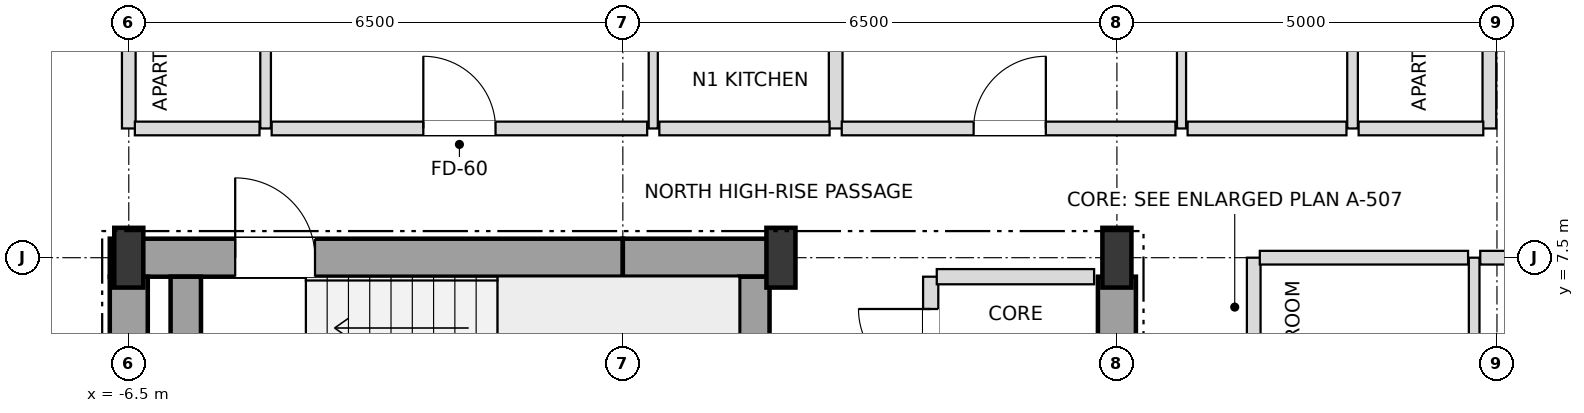
"""IFC4 building model, lengths in metres.
Left out: names, types, materials, properties, quantities, classifications, styles, units other than length and angle.
Written with IfcOpenShell. Run it as: python <this file> out.ifc"""

import sys

from ifc_helpers import new_model, si_unit, direction, frame, frame_2d, origin, origin_2d, place, context, subcontext, project, spatial, rectangle, i_section, extrude, element, fill, save


model = new_model("IFC4")
c1 = context("Model", 3, precision=1e-05, world=origin(), true_north=direction((0.0, 1.0)))
c2 = subcontext(c1, "Body", "Model", "MODEL_VIEW")
j1 = project(units=[si_unit("LENGTHUNIT", "METRE"), si_unit("PLANEANGLEUNIT", "RADIAN")], contexts=[c1])
p1 = place(None, origin())
s1 = spatial("IfcSite", under=j1, at=p1, CompositionType="ELEMENT")
p2 = place(p1, origin())
s2 = spatial("IfcBuilding", under=s1, at=p2, CompositionType="ELEMENT")
p3 = place(p2, frame((0.0, 0.0, 240.3)))
s3 = spatial("IfcBuildingStorey", under=s2, at=p3, CompositionType="ELEMENT", Elevation=240.3)
for number, where, z_axis, x_axis in (
    (1, (-6.5, 7.5, 0.0), (0.0, 0.0, 1.0), (1.0, 0.0, 0.0)),
    (2, (2.08, 7.5, 0.0), (0.0, 0.0, 1.0), (1.0, 0.0, 0.0)),
    (3, (6.5, 7.5, 0.0), (0.0, 0.0, 1.0), (1.0, 0.0, 0.0)),
):
    element("IfcColumn", number, at=place(p3, frame(where, z_axis=z_axis, x_axis=x_axis)), inside=s3, PredefinedType="COLUMN", context=c2, shape_type="SweptSolid", body=[
        extrude(i_section(OverallWidth=0.382, OverallDepth=0.786, WebThickness=0.02, FlangeThickness=0.033, at=origin_2d()), origin(), (0.0, 0.0, 1.0), 3.6),
    ])
p4 = place(p3, frame((-6.75, 7.5, 0.0), z_axis=(0.0, 0.0, 1.0), x_axis=(1.0, 0.0, 0.0)))
e4 = element("IfcWall", 4, at=p4, inside=s3, PredefinedType="SHEAR", context=c2, shape_type="SweptSolid", body=[
    extrude(rectangle(XDim=6.75, YDim=0.5, at=frame_2d((3.375, 0.0))), origin(), (0.0, 0.0, 1.0), 3.38),
])
p5 = place(p4, frame((1.65, 0.0, 0.0)))
e5 = element("IfcOpeningElement", 5, at=p5, cuts=e4, PredefinedType="OPENING", context=c2, shape_type="SweptSolid", body=[
    extrude(rectangle(XDim=1.05, YDim=2.15, at=frame_2d((0.525, 1.075))), frame((0.0, 0.26, 0.0), z_axis=(0.0, -1.0, 0.0), x_axis=(1.0, 0.0, 0.0)), (0.0, 0.0, 1.0), 0.52),
])
p6 = place(p3, frame((0.0, 7.5, 0.0), z_axis=(0.0, 0.0, 1.0), x_axis=(1.0, 0.0, 0.0)))
e6 = element("IfcWall", 6, at=p6, inside=s3, PredefinedType="SHEAR", context=c2, shape_type="SweptSolid", body=[
    extrude(rectangle(XDim=2.08, YDim=0.5, at=frame_2d((1.04, 0.0))), origin(), (0.0, 0.0, 1.0), 3.38),
])
for number, where, z_axis, x_axis in (
    (7, (-6.5, 3.95, 0.0), (0.0, 0.0, 1.0), (0.0, 1.0, 0.0)),
    (8, (6.5, 3.95, 0.0), (0.0, 0.0, 1.0), (0.0, 1.0, 0.0)),
):
    element("IfcWall", number, at=place(p3, frame(where, z_axis=z_axis, x_axis=x_axis)), inside=s3, PredefinedType="SHEAR", context=c2, shape_type="SweptSolid", body=[
        extrude(rectangle(XDim=3.3, YDim=0.5, at=frame_2d((1.65, 0.0))), origin(), (0.0, 0.0, 1.0), 3.38),
    ])
for number, where, z_axis, x_axis in (
    (9, (1.73, 3.95, 0.0), (0.0, 0.0, 1.0), (0.0, 1.0, 0.0)),
    (10, (-5.75, 3.95, 0.0), (0.0, 0.0, 1.0), (0.0, 1.0, 0.0)),
):
    element("IfcWall", number, at=place(p3, frame(where, z_axis=z_axis, x_axis=x_axis)), inside=s3, PredefinedType="SHEAR", context=c2, shape_type="SweptSolid", body=[
        extrude(rectangle(XDim=3.3, YDim=0.4, at=frame_2d((1.65, 0.0))), origin(), (0.0, 0.0, 1.0), 3.38),
    ])
p7 = place(p3, frame((-6.5, 9.2, 0.0), z_axis=(0.0, 0.0, 1.0), x_axis=(0.0, 1.0, 0.0)))
e11 = element("IfcWall", 11, at=p7, inside=s3, PredefinedType="PARTITIONING", context=c2, shape_type="SweptSolid", body=[
    extrude(rectangle(XDim=10.7, YDim=0.18, at=frame_2d((5.35, 0.0))), origin(), (0.0, 0.0, 1.0), 2.826),
])
p8 = place(p3, frame((-4.7, 9.2, 0.0), z_axis=(0.0, 0.0, 1.0), x_axis=(0.0, 1.0, 0.0)))
e12 = element("IfcWall", 12, at=p8, inside=s3, PredefinedType="PARTITIONING", context=c2, shape_type="SweptSolid", body=[
    extrude(rectangle(XDim=4.7, YDim=0.14, at=frame_2d((2.35, 0.0))), origin(), (0.0, 0.0, 1.0), 3.38),
])
p9 = place(p8, frame((1.9, 0.0, 0.0)))
e13 = element("IfcOpeningElement", 13, at=p9, cuts=e12, PredefinedType="OPENING", context=c2, shape_type="SweptSolid", body=[
    extrude(rectangle(XDim=0.9, YDim=2.1, at=frame_2d((0.45, 1.05))), frame((0.0, 0.08, 0.0), z_axis=(0.0, -1.0, 0.0), x_axis=(1.0, 0.0, 0.0)), (0.0, 0.0, 1.0), 0.16),
])
p10 = place(p3, frame((0.4, 9.2, 0.0), z_axis=(0.0, 0.0, 1.0), x_axis=(0.0, 1.0, 0.0)))
e14 = element("IfcWall", 14, at=p10, inside=s3, PredefinedType="PARTITIONING", context=c2, shape_type="SweptSolid", body=[
    extrude(rectangle(XDim=4.7, YDim=0.12, at=frame_2d((2.35, 0.0))), origin(), (0.0, 0.0, 1.0), 3.38),
])
p11 = place(p10, frame((1.875, 0.0, 0.0)))
e15 = element("IfcOpeningElement", 15, at=p11, cuts=e14, PredefinedType="OPENING", context=c2, shape_type="SweptSolid", body=[
    extrude(rectangle(XDim=0.95, YDim=2.1, at=frame_2d((0.475, 1.05))), frame((0.0, 0.07, 0.0), z_axis=(0.0, -1.0, 0.0), x_axis=(1.0, 0.0, 0.0)), (0.0, 0.0, 1.0), 0.14),
])
p12 = place(p3, frame((2.8, 9.2, 0.0), z_axis=(0.0, 0.0, 1.0), x_axis=(0.0, 1.0, 0.0)))
e16 = element("IfcWall", 16, at=p12, inside=s3, PredefinedType="PARTITIONING", context=c2, shape_type="SweptSolid", body=[
    extrude(rectangle(XDim=10.7, YDim=0.18, at=frame_2d((5.35, 0.0))), origin(), (0.0, 0.0, 1.0), 3.018),
])
p13 = place(p3, frame((4.05, 5.55, 0.0), z_axis=(0.0, 0.0, 1.0), x_axis=(0.0, 1.0, 0.0)))
e17 = element("IfcWall", 17, at=p13, inside=s3, PredefinedType="SOLIDWALL", context=c2, shape_type="SweptSolid", body=[
    extrude(rectangle(XDim=1.7, YDim=0.2, at=frame_2d((0.85, 0.0))), origin(), (0.0, 0.0, 1.0), 3.38),
])
p14 = place(p13, frame((0.325, 0.0, 0.0)))
e18 = element("IfcOpeningElement", 18, at=p14, cuts=e17, PredefinedType="OPENING", context=c2, shape_type="SweptSolid", body=[
    extrude(rectangle(XDim=0.95, YDim=2.15, at=frame_2d((0.475, 1.075))), frame((0.0, 0.11, 0.0), z_axis=(0.0, -1.0, 0.0), x_axis=(1.0, 0.0, 0.0)), (0.0, 0.0, 1.0), 0.22),
])
p15 = place(p3, frame((7.35, 9.2, 0.0), z_axis=(0.0, 0.0, 1.0), x_axis=(0.0, 1.0, 0.0)))
e19 = element("IfcWall", 19, at=p15, inside=s3, PredefinedType="PARTITIONING", context=c2, shape_type="SweptSolid", body=[
    extrude(rectangle(XDim=10.7, YDim=0.12, at=frame_2d((5.35, 0.0))), origin(), (0.0, 0.0, 1.0), 2.826),
])
p16 = place(p15, frame((1.875, 0.0, 0.0)))
e20 = element("IfcOpeningElement", 20, at=p16, cuts=e19, PredefinedType="OPENING", context=c2, shape_type="SweptSolid", body=[
    extrude(rectangle(XDim=0.95, YDim=2.1, at=frame_2d((0.475, 1.05))), frame((0.0, 0.07, 0.0), z_axis=(0.0, -1.0, 0.0), x_axis=(1.0, 0.0, 0.0)), (0.0, 0.0, 1.0), 0.14),
])
p17 = place(p15, frame((7.25, 0.0, 0.0)))
e21 = element("IfcOpeningElement", 21, at=p17, cuts=e19, PredefinedType="OPENING", context=c2, shape_type="SweptSolid", body=[
    extrude(rectangle(XDim=0.9, YDim=2.1, at=frame_2d((0.45, 1.05))), frame((0.0, 0.07, 0.0), z_axis=(0.0, -1.0, 0.0), x_axis=(1.0, 0.0, 0.0)), (0.0, 0.0, 1.0), 0.14),
])
p18 = place(p3, frame((8.3, -7.5, 0.0), z_axis=(0.0, 0.0, 1.0), x_axis=(0.0, 1.0, 0.0)))
e22 = element("IfcWall", 22, at=p18, inside=s3, PredefinedType="PARTITIONING", context=c2, shape_type="SweptSolid", body=[
    extrude(rectangle(XDim=15.0, YDim=0.18, at=frame_2d((7.5, 0.0))), origin(), (0.0, 0.0, 1.0), 3.38),
])
p19 = place(p18, frame((2.355, 0.0, 0.0)))
e23 = element("IfcOpeningElement", 23, at=p19, cuts=e22, PredefinedType="OPENING", context=c2, shape_type="SweptSolid", body=[
    extrude(rectangle(XDim=0.95, YDim=2.15, at=frame_2d((0.475, 1.075))), frame((0.0, 0.1, 0.0), z_axis=(0.0, -1.0, 0.0), x_axis=(1.0, 0.0, 0.0)), (0.0, 0.0, 1.0), 0.2),
])
p20 = place(p3, frame((9.6, 9.2, 0.0), z_axis=(0.0, 0.0, 1.0), x_axis=(0.0, 1.0, 0.0)))
e24 = element("IfcWall", 24, at=p20, inside=s3, PredefinedType="PARTITIONING", context=c2, shape_type="SweptSolid", body=[
    extrude(rectangle(XDim=4.7, YDim=0.14, at=frame_2d((2.35, 0.0))), origin(), (0.0, 0.0, 1.0), 2.826),
])
p21 = place(p20, frame((1.9, 0.0, 0.0)))
e25 = element("IfcOpeningElement", 25, at=p21, cuts=e24, PredefinedType="OPENING", context=c2, shape_type="SweptSolid", body=[
    extrude(rectangle(XDim=0.9, YDim=2.1, at=frame_2d((0.45, 1.05))), frame((0.0, 0.08, 0.0), z_axis=(0.0, -1.0, 0.0), x_axis=(1.0, 0.0, 0.0)), (0.0, 0.0, 1.0), 0.16),
])
p22 = place(p3, frame((11.2, -7.5, 0.0), z_axis=(0.0, 0.0, 1.0), x_axis=(0.0, 1.0, 0.0)))
e26 = element("IfcWall", 26, at=p22, inside=s3, PredefinedType="PARTITIONING", context=c2, shape_type="SweptSolid", body=[
    extrude(rectangle(XDim=15.0, YDim=0.14, at=frame_2d((7.5, 0.0))), origin(), (0.0, 0.0, 1.0), 3.38),
])
p23 = place(p22, frame((3.475, 0.0, 0.0)))
e27 = element("IfcOpeningElement", 27, at=p23, cuts=e26, PredefinedType="OPENING", context=c2, shape_type="SweptSolid", body=[
    extrude(rectangle(XDim=0.95, YDim=2.1, at=frame_2d((0.475, 1.05))), frame((0.0, 0.08, 0.0), z_axis=(0.0, -1.0, 0.0), x_axis=(1.0, 0.0, 0.0)), (0.0, 0.0, 1.0), 0.16),
])
p24 = place(p3, frame((11.4, 9.2, 0.0), z_axis=(0.0, 0.0, 1.0), x_axis=(0.0, 1.0, 0.0)))
e28 = element("IfcWall", 28, at=p24, inside=s3, PredefinedType="PARTITIONING", context=c2, shape_type="SweptSolid", body=[
    extrude(rectangle(XDim=5.07, YDim=0.18, at=frame_2d((2.535, 0.0))), origin(), (0.0, 0.0, 1.0), 2.748),
])
p25 = place(p3, frame((4.13, 7.25, 0.0), z_axis=(0.0, 0.0, 1.0), x_axis=(1.0, 0.0, 0.0)))
e29 = element("IfcWall", 29, at=p25, inside=s3, PredefinedType="SOLIDWALL", context=c2, shape_type="SweptSolid", body=[
    extrude(rectangle(XDim=2.07, YDim=0.2, at=frame_2d((1.035, 0.0))), origin(), (0.0, 0.0, 1.0), 3.38),
])
p26 = place(p3, frame((8.38, 7.5, 0.0), z_axis=(0.0, 0.0, 1.0), x_axis=(1.0, 0.0, 0.0)))
e30 = element("IfcWall", 30, at=p26, inside=s3, PredefinedType="PARTITIONING", context=c2, shape_type="SweptSolid", body=[
    extrude(rectangle(XDim=2.74, YDim=0.18, at=frame_2d((1.37, 0.0))), origin(), (0.0, 0.0, 1.0), 2.826),
])
p27 = place(p3, frame((11.28, 7.5, 0.0), z_axis=(0.0, 0.0, 1.0), x_axis=(1.0, 0.0, 0.0)))
e31 = element("IfcWall", 31, at=p27, inside=s3, PredefinedType="PARTITIONING", context=c2, shape_type="SweptSolid", body=[
    extrude(rectangle(XDim=5.62, YDim=0.18, at=frame_2d((2.81, 0.0))), origin(), (0.0, 0.0, 1.0), 2.826),
])
p28 = place(p3, frame((-6.42, 9.2, 0.0), z_axis=(0.0, 0.0, 1.0), x_axis=(1.0, 0.0, 0.0)))
e32 = element("IfcWall", 32, at=p28, inside=s3, PredefinedType="PARTITIONING", context=c2, shape_type="SweptSolid", body=[
    extrude(rectangle(XDim=1.64, YDim=0.18, at=frame_2d((0.82, 0.0))), origin(), (0.0, 0.0, 1.0), 3.38),
])
p29 = place(p3, frame((-4.62, 9.2, 0.0), z_axis=(0.0, 0.0, 1.0), x_axis=(1.0, 0.0, 0.0)))
e33 = element("IfcWall", 33, at=p29, inside=s3, PredefinedType="PARTITIONING", context=c2, shape_type="SweptSolid", body=[
    extrude(rectangle(XDim=4.94, YDim=0.18, at=frame_2d((2.47, 0.0))), origin(), (0.0, 0.0, 1.0), 3.38),
])
p30 = place(p29, frame((1.995, 0.0, 0.0)))
e34 = element("IfcOpeningElement", 34, at=p30, cuts=e33, PredefinedType="OPENING", context=c2, shape_type="SweptSolid", body=[
    extrude(rectangle(XDim=0.95, YDim=2.15, at=frame_2d((0.475, 1.075))), frame((0.0, 0.1, 0.0), z_axis=(0.0, -1.0, 0.0), x_axis=(1.0, 0.0, 0.0)), (0.0, 0.0, 1.0), 0.2),
])
p31 = place(p3, frame((0.48, 9.2, 0.0), z_axis=(0.0, 0.0, 1.0), x_axis=(1.0, 0.0, 0.0)))
e35 = element("IfcWall", 35, at=p31, inside=s3, PredefinedType="PARTITIONING", context=c2, shape_type="SweptSolid", body=[
    extrude(rectangle(XDim=2.24, YDim=0.18, at=frame_2d((1.12, 0.0))), origin(), (0.0, 0.0, 1.0), 3.38),
])
p32 = place(p3, frame((2.88, 9.2, 0.0), z_axis=(0.0, 0.0, 1.0), x_axis=(1.0, 0.0, 0.0)))
e36 = element("IfcWall", 36, at=p32, inside=s3, PredefinedType="PARTITIONING", context=c2, shape_type="SweptSolid", body=[
    extrude(rectangle(XDim=4.39, YDim=0.18, at=frame_2d((2.195, 0.0))), origin(), (0.0, 0.0, 1.0), 2.826),
])
p33 = place(p32, frame((1.735, 0.0, 0.0)))
e37 = element("IfcOpeningElement", 37, at=p33, cuts=e36, PredefinedType="OPENING", context=c2, shape_type="SweptSolid", body=[
    extrude(rectangle(XDim=0.95, YDim=2.15, at=frame_2d((0.475, 1.075))), frame((0.0, 0.1, 0.0), z_axis=(0.0, -1.0, 0.0), x_axis=(1.0, 0.0, 0.0)), (0.0, 0.0, 1.0), 0.2),
])
p34 = place(p3, frame((7.43, 9.2, 0.0), z_axis=(0.0, 0.0, 1.0), x_axis=(1.0, 0.0, 0.0)))
e38 = element("IfcWall", 38, at=p34, inside=s3, PredefinedType="PARTITIONING", context=c2, shape_type="SweptSolid", body=[
    extrude(rectangle(XDim=2.09, YDim=0.18, at=frame_2d((1.045, 0.0))), origin(), (0.0, 0.0, 1.0), 3.38),
])
p35 = place(p3, frame((9.68, 9.2, 0.0), z_axis=(0.0, 0.0, 1.0), x_axis=(1.0, 0.0, 0.0)))
e39 = element("IfcWall", 39, at=p35, inside=s3, PredefinedType="PARTITIONING", context=c2, shape_type="SweptSolid", body=[
    extrude(rectangle(XDim=1.64, YDim=0.18, at=frame_2d((0.82, 0.0))), origin(), (0.0, 0.0, 1.0), 3.38),
])
p36 = place(p5, origin())
e40 = element("IfcDoor", 40, at=p36, inside=s3, OperationType="SINGLE_SWING_LEFT", PredefinedType="DOOR", context=c2, shape_type="SweptSolid", body=[
    extrude(rectangle(XDim=1.05, YDim=2.15, at=frame_2d((0.525, 1.075))), frame((0.0, 0.025, 0.0), z_axis=(0.0, -1.0, 0.0), x_axis=(1.0, 0.0, 0.0)), (0.0, 0.0, 1.0), 0.05),
])
fill(e5, e40)
p37 = place(p14, origin())
e41 = element("IfcDoor", 41, at=p37, inside=s3, OperationType="SINGLE_SWING_RIGHT", PredefinedType="DOOR", context=c2, shape_type="SweptSolid", body=[
    extrude(rectangle(XDim=0.95, YDim=2.15, at=frame_2d((0.475, 1.075))), frame((0.0, 0.025, 0.0), z_axis=(0.0, -1.0, 0.0), x_axis=(1.0, 0.0, 0.0)), (0.0, 0.0, 1.0), 0.05),
])
fill(e18, e41)
p38 = place(p30, origin())
e42 = element("IfcDoor", 42, at=p38, inside=s3, OperationType="SINGLE_SWING_LEFT", PredefinedType="DOOR", context=c2, shape_type="SweptSolid", body=[
    extrude(rectangle(XDim=0.95, YDim=2.15, at=frame_2d((0.475, 1.075))), frame((0.0, 0.025, 0.0), z_axis=(0.0, -1.0, 0.0), x_axis=(1.0, 0.0, 0.0)), (0.0, 0.0, 1.0), 0.05),
])
fill(e34, e42)
p39 = place(p33, origin())
e43 = element("IfcDoor", 43, at=p39, inside=s3, OperationType="SINGLE_SWING_RIGHT", PredefinedType="DOOR", context=c2, shape_type="SweptSolid", body=[
    extrude(rectangle(XDim=0.95, YDim=2.15, at=frame_2d((0.475, 1.075))), frame((0.0, 0.025, 0.0), z_axis=(0.0, -1.0, 0.0), x_axis=(1.0, 0.0, 0.0)), (0.0, 0.0, 1.0), 0.05),
])
fill(e37, e43)
save(model, sys.argv[1])
